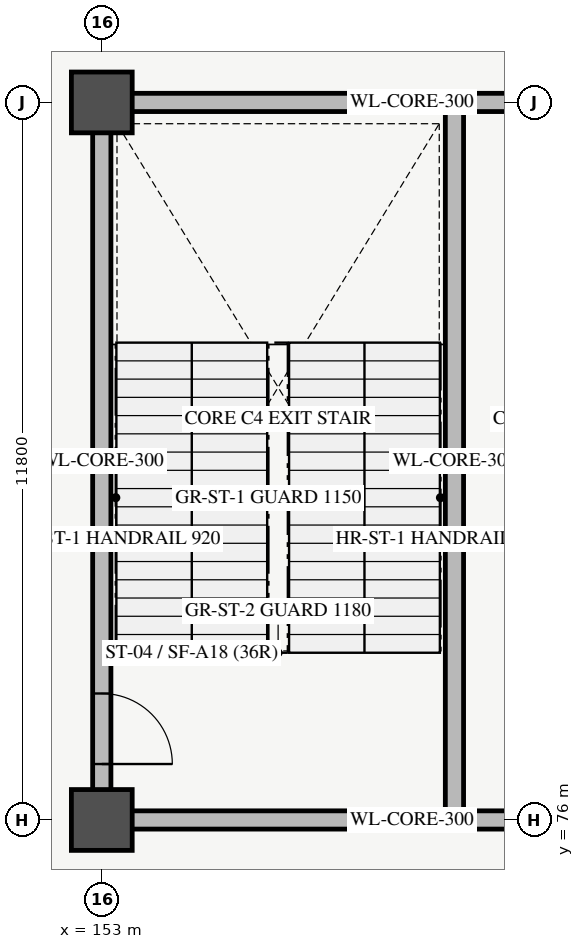
"""IFC4 building model, lengths in metres.
Left out: names, types, materials, properties, quantities, classifications, styles, units other than length and angle.
Written with IfcOpenShell. Run it as: python <this file> out.ifc"""

import sys

from ifc_helpers import new_model, si_unit, direction, frame, frame_2d, origin, origin_2d, place, context, subcontext, project, spatial, rectangle, circle, extrude, element, fill, save


model = new_model("IFC4")
c1 = context("Model", 3, precision=1e-05, world=origin(), true_north=direction((0.0, 1.0)))
c2 = subcontext(c1, "Body", "Model", "MODEL_VIEW")
j1 = project(units=[si_unit("LENGTHUNIT", "METRE"), si_unit("PLANEANGLEUNIT", "RADIAN")], contexts=[c1])
p1 = place(None, origin())
s1 = spatial("IfcSite", under=j1, at=p1, CompositionType="ELEMENT")
p2 = place(p1, origin())
s2 = spatial("IfcBuilding", under=s1, at=p2, CompositionType="ELEMENT")
p3 = place(p2, origin())
s3 = spatial("IfcBuildingStorey", under=s2, at=p3, CompositionType="ELEMENT", Elevation=0.0)
for number, where, z_axis, x_axis in (
    (1, (153.0, 76.0, 0.0), (0.0, 0.0, 1.0), (1.0, 0.0, 0.0)),
    (2, (153.0, 87.8, 0.0), (0.0, 0.0, 1.0), (1.0, 0.0, 0.0)),
):
    element("IfcColumn", number, at=place(p3, frame(where, z_axis=z_axis, x_axis=x_axis)), inside=s3, PredefinedType="COLUMN", context=c2, shape_type="SweptSolid", body=[
        extrude(circle(Radius=0.5, at=origin_2d()), origin(), (0.0, 0.0, 1.0), 5.4),
    ])
p4 = place(p3, frame((153.0, 76.0, 0.0), z_axis=(0.0, 0.0, 1.0), x_axis=(1.0, 0.0, 0.0)))
e3 = element("IfcWall", 3, at=p4, inside=s3, PredefinedType="SHEAR", context=c2, shape_type="SweptSolid", body=[
    extrude(rectangle(XDim=10.2, YDim=0.3, at=frame_2d((5.1, 0.0))), origin(), (0.0, 0.0, 1.0), 5.4),
])
p5 = place(p4, frame((7.4, 0.0, 0.0)))
e4 = element("IfcOpeningElement", 4, at=p5, cuts=e3, PredefinedType="OPENING", context=c2, shape_type="SweptSolid", body=[
    extrude(rectangle(XDim=1.1, YDim=2.2, at=frame_2d((0.55, 1.1))), frame((0.0, 0.16, 0.0), z_axis=(0.0, -1.0, 0.0), x_axis=(1.0, 0.0, 0.0)), (0.0, 0.0, 1.0), 0.32),
])
p6 = place(p3, frame((153.0, 87.8, 0.0), z_axis=(0.0, 0.0, 1.0), x_axis=(1.0, 0.0, 0.0)))
e5 = element("IfcWall", 5, at=p6, inside=s3, PredefinedType="SHEAR", context=c2, shape_type="SweptSolid", body=[
    extrude(rectangle(XDim=10.2, YDim=0.3, at=frame_2d((5.1, 0.0))), origin(), (0.0, 0.0, 1.0), 5.4),
])
p7 = place(p3, frame((153.0, 76.0, 0.0), z_axis=(0.0, 0.0, 1.0), x_axis=(0.0, 1.0, 0.0)))
e6 = element("IfcWall", 6, at=p7, inside=s3, PredefinedType="SHEAR", context=c2, shape_type="SweptSolid", body=[
    extrude(rectangle(XDim=11.8, YDim=0.3, at=frame_2d((5.9, 0.0))), origin(), (0.0, 0.0, 1.0), 5.4),
])
p8 = place(p7, frame((0.92, 0.0, 0.0)))
e7 = element("IfcOpeningElement", 7, at=p8, cuts=e6, PredefinedType="OPENING", context=c2, shape_type="SweptSolid", body=[
    extrude(rectangle(XDim=1.16, YDim=2.2, at=frame_2d((0.58, 1.1))), frame((0.0, 0.16, 0.0), z_axis=(0.0, -1.0, 0.0), x_axis=(1.0, 0.0, 0.0)), (0.0, 0.0, 1.0), 0.32),
])
p9 = place(p3, frame((158.8, 76.15, 0.0), z_axis=(0.0, 0.0, 1.0), x_axis=(0.0, 1.0, 0.0)))
e8 = element("IfcWall", 8, at=p9, inside=s3, PredefinedType="SHEAR", context=c2, shape_type="SweptSolid", body=[
    extrude(rectangle(XDim=11.5, YDim=0.3, at=frame_2d((5.75, 0.0))), origin(), (0.0, 0.0, 1.0), 5.4),
])
p10 = place(p8, origin())
e9 = element("IfcDoor", 9, at=p10, inside=s3, OperationType="SINGLE_SWING_LEFT", PredefinedType="DOOR", context=c2, shape_type="SweptSolid", body=[
    extrude(rectangle(XDim=1.16, YDim=2.2, at=frame_2d((0.58, 1.1))), frame((0.0, 0.025, 0.0), z_axis=(0.0, -1.0, 0.0), x_axis=(1.0, 0.0, 0.0)), (0.0, 0.0, 1.0), 0.05),
])
fill(e7, e9)
save(model, sys.argv[1])
